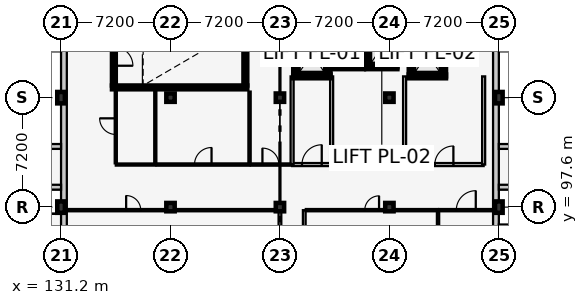
"""IFC4 building model, lengths in metres.
Left out: names, types, materials, properties, quantities, classifications, styles, units other than length and angle.
Written with IfcOpenShell. Run it as: python <this file> out.ifc"""

import sys

from ifc_helpers import new_model, si_unit, direction, frame, frame_2d, origin, origin_2d, place, context, subcontext, project, spatial, rectangle, extrude, element, fill, save


model = new_model("IFC4")
c1 = context("Model", 3, precision=1e-05, world=origin(), true_north=direction((0.0, 1.0)))
c2 = subcontext(c1, "Body", "Model", "MODEL_VIEW")
j1 = project(units=[si_unit("LENGTHUNIT", "METRE"), si_unit("PLANEANGLEUNIT", "RADIAN")], contexts=[c1])
p1 = place(None, origin())
s1 = spatial("IfcSite", under=j1, at=p1, CompositionType="ELEMENT")
p2 = place(p1, origin())
s2 = spatial("IfcBuilding", under=s1, at=p2, CompositionType="ELEMENT")
p3 = place(p2, frame((0.0, 0.0, 29.7)))
s3 = spatial("IfcBuildingStorey", under=s2, at=p3, CompositionType="ELEMENT", Elevation=29.7)
for number, where, z_axis, x_axis in (
    (1, (131.2, 97.6, 0.0), (0.0, 0.0, 1.0), (1.0, 0.0, 0.0)),
    (2, (131.2, 104.8, 0.0), (0.0, 0.0, 1.0), (1.0, 0.0, 0.0)),
):
    element("IfcColumn", number, at=place(p3, frame(where, z_axis=z_axis, x_axis=x_axis)), inside=s3, PredefinedType="COLUMN", context=c2, shape_type="SweptSolid", body=[
        extrude(rectangle(XDim=0.5, YDim=0.75, at=origin_2d()), origin(), (0.0, 0.0, 1.0), 4.2),
    ])
for number, where, z_axis, x_axis in (
    (3, (138.4, 97.6, 0.0), (0.0, 0.0, 1.0), (1.0, 0.0, 0.0)),
    (4, (138.4, 104.8, 0.0), (0.0, 0.0, 1.0), (1.0, 0.0, 0.0)),
    (5, (145.6, 97.6, 0.0), (0.0, 0.0, 1.0), (1.0, 0.0, 0.0)),
    (6, (145.6, 104.8, 0.0), (0.0, 0.0, 1.0), (1.0, 0.0, 0.0)),
    (7, (152.8, 97.6, 0.0), (0.0, 0.0, 1.0), (1.0, 0.0, 0.0)),
    (8, (152.8, 104.8, 0.0), (0.0, 0.0, 1.0), (1.0, 0.0, 0.0)),
):
    element("IfcColumn", number, at=place(p3, frame(where, z_axis=z_axis, x_axis=x_axis)), inside=s3, PredefinedType="COLUMN", context=c2, shape_type="SweptSolid", body=[
        extrude(rectangle(XDim=0.55, YDim=0.55, at=origin_2d()), origin(), (0.0, 0.0, 1.0), 4.2),
    ])
for number, where, z_axis, x_axis in (
    (9, (160.0, 97.6, 0.0), (0.0, 0.0, 1.0), (1.0, 0.0, 0.0)),
    (10, (160.0, 104.8, 0.0), (0.0, 0.0, 1.0), (1.0, 0.0, 0.0)),
):
    element("IfcColumn", number, at=place(p3, frame(where, z_axis=z_axis, x_axis=x_axis)), inside=s3, PredefinedType="COLUMN", context=c2, shape_type="SweptSolid", body=[
        extrude(rectangle(XDim=0.5, YDim=0.75, at=origin_2d()), origin(), (0.0, 0.0, 1.0), 4.2),
    ])
p4 = place(p3, frame((159.81, 112.0, 0.0), z_axis=(0.0, 0.0, 1.0), x_axis=(0.0, -1.0, 0.0)))
e11 = element("IfcWall", 11, at=p4, inside=s3, PredefinedType="SOLIDWALL", context=c2, shape_type="SweptSolid", body=[
    extrude(rectangle(XDim=28.8, YDim=0.38, at=frame_2d((14.4, 0.0))), origin(), (0.0, 0.0, 1.0), 3.455),
])
for number, where, z_axis, x_axis in (
    (12, (160.0, 96.29, 0.0), (0.0, 0.0, 1.0), (1.0, 0.0, 0.0)),
    (13, (160.0, 98.91, 0.0), (0.0, 0.0, 1.0), (1.0, 0.0, 0.0)),
):
    element("IfcWall", number, at=place(p3, frame(where, z_axis=z_axis, x_axis=x_axis)), inside=s3, PredefinedType="SOLIDWALL", context=c2, shape_type="SweptSolid", body=[
        extrude(rectangle(XDim=1.35, YDim=0.32, at=frame_2d((0.675, 0.0))), origin(), (0.0, 0.0, 1.0), 4.18),
    ])
p5 = place(p3, frame((160.0, 101.59, 0.0), z_axis=(0.0, 0.0, 1.0), x_axis=(1.0, 0.0, 0.0)))
e14 = element("IfcWall", 14, at=p5, inside=s3, PredefinedType="SOLIDWALL", context=c2, shape_type="SweptSolid", body=[
    extrude(rectangle(XDim=1.793, YDim=0.32, at=frame_2d((0.896, 0.0))), origin(), (0.0, 0.0, 1.0), 4.18),
])
p6 = place(p3, frame((131.39, 83.2, 0.0), z_axis=(0.0, 0.0, 1.0), x_axis=(0.0, 1.0, 0.0)))
e15 = element("IfcWall", 15, at=p6, inside=s3, PredefinedType="SOLIDWALL", context=c2, shape_type="SweptSolid", body=[
    extrude(rectangle(XDim=28.8, YDim=0.38, at=frame_2d((14.4, 0.0))), origin(), (0.0, 0.0, 1.0), 3.455),
])
p7 = place(p6, frame((10.2, 0.0, 0.0)))
e16 = element("IfcOpeningElement", 16, at=p7, cuts=e15, PredefinedType="OPENING", context=c2, shape_type="SweptSolid", body=[
    extrude(rectangle(XDim=1.2, YDim=2.15, at=frame_2d((0.6, 1.075))), frame((0.0, 0.202, 0.0), z_axis=(0.0, -1.0, 0.0), x_axis=(1.0, 0.0, 0.0)), (0.0, 0.0, 1.0), 0.404),
])
p8 = place(p3, frame((131.2, 98.91, 0.0), z_axis=(0.0, 0.0, 1.0), x_axis=(-1.0, 0.0, 0.0)))
e17 = element("IfcWall", 17, at=p8, inside=s3, PredefinedType="SOLIDWALL", context=c2, shape_type="SweptSolid", body=[
    extrude(rectangle(XDim=1.793, YDim=0.32, at=frame_2d((0.896, 0.0))), origin(), (0.0, 0.0, 1.0), 4.18),
])
p9 = place(p3, frame((131.2, 101.59, 0.0), z_axis=(0.0, 0.0, 1.0), x_axis=(-1.0, 0.0, 0.0)))
e18 = element("IfcWall", 18, at=p9, inside=s3, PredefinedType="SOLIDWALL", context=c2, shape_type="SweptSolid", body=[
    extrude(rectangle(XDim=1.35, YDim=0.32, at=frame_2d((0.675, 0.0))), origin(), (0.0, 0.0, 1.0), 4.18),
])
p10 = place(p3, frame((134.55, 105.475, 0.0), z_axis=(0.0, 0.0, 1.0), x_axis=(1.0, 0.0, 0.0)))
e19 = element("IfcWall", 19, at=p10, inside=s3, PredefinedType="SHEAR", context=c2, shape_type="SweptSolid", body=[
    extrude(rectangle(XDim=8.9, YDim=0.25, at=frame_2d((4.45, 0.0))), origin(), (0.0, 0.0, 1.0), 4.2),
])
p11 = place(p3, frame((134.675, 109.45, 0.0), z_axis=(0.0, 0.0, 1.0), x_axis=(0.0, -1.0, 0.0)))
e20 = element("IfcWall", 20, at=p11, inside=s3, PredefinedType="SHEAR", context=c2, shape_type="SweptSolid", body=[
    extrude(rectangle(XDim=3.85, YDim=0.25, at=frame_2d((1.925, 0.0))), origin(), (0.0, 0.0, 1.0), 4.2),
])
p12 = place(p11, frame((1.3, 0.0, 0.0)))
e21 = element("IfcOpeningElement", 21, at=p12, cuts=e20, PredefinedType="OPENING", context=c2, shape_type="SweptSolid", body=[
    extrude(rectangle(XDim=1.25, YDim=2.15, at=frame_2d((0.625, 1.075))), frame((0.0, 0.137, 0.0), z_axis=(0.0, -1.0, 0.0), x_axis=(1.0, 0.0, 0.0)), (0.0, 0.0, 1.0), 0.274),
])
p13 = place(p3, frame((143.325, 105.6, 0.0), z_axis=(0.0, 0.0, 1.0), x_axis=(0.0, 1.0, 0.0)))
e22 = element("IfcWall", 22, at=p13, inside=s3, PredefinedType="SHEAR", context=c2, shape_type="SweptSolid", body=[
    extrude(rectangle(XDim=3.85, YDim=0.25, at=frame_2d((1.925, 0.0))), origin(), (0.0, 0.0, 1.0), 4.2),
])
p14 = place(p3, frame((146.475, 106.2, 0.0), z_axis=(0.0, 0.0, 1.0), x_axis=(1.0, 0.0, 0.0)))
e23 = element("IfcWall", 23, at=p14, inside=s3, PredefinedType="SHEAR", context=c2, shape_type="SweptSolid", body=[
    extrude(rectangle(XDim=2.45, YDim=0.25, at=frame_2d((1.225, 0.0))), origin(), (0.0, 0.0, 1.0), 4.2),
])
p15 = place(p14, frame((0.675, 0.0, 0.0)))
e24 = element("IfcOpeningElement", 24, at=p15, cuts=e23, PredefinedType="OPENING", context=c2, shape_type="SweptSolid", body=[
    extrude(rectangle(XDim=1.1, YDim=2.15, at=frame_2d((0.55, 1.075))), frame((0.0, 0.137, 0.0), z_axis=(0.0, -1.0, 0.0), x_axis=(1.0, 0.0, 0.0)), (0.0, 0.0, 1.0), 0.274),
])
for number, where, z_axis, x_axis in (
    (25, (146.6, 109.2, 0.0), (0.0, 0.0, 1.0), (0.0, -1.0, 0.0)),
    (26, (148.8, 106.2, 0.0), (0.0, 0.0, 1.0), (0.0, 1.0, 0.0)),
):
    element("IfcWall", number, at=place(p3, frame(where, z_axis=z_axis, x_axis=x_axis)), inside=s3, PredefinedType="SHEAR", context=c2, shape_type="SweptSolid", body=[
        extrude(rectangle(XDim=3.0, YDim=0.25, at=frame_2d((1.5, 0.0))), origin(), (0.0, 0.0, 1.0), 4.2),
    ])
p16 = place(p3, frame((146.4, 100.4, 0.0), z_axis=(0.0, 0.0, 1.0), x_axis=(1.0, 0.0, 0.0)))
e27 = element("IfcWall", 27, at=p16, inside=s3, PredefinedType="PARTITIONING", context=c2, shape_type="SweptSolid", body=[
    extrude(rectangle(XDim=2.6, YDim=0.2, at=frame_2d((1.3, 0.0))), origin(), (0.0, 0.0, 1.0), 4.2),
])
p17 = place(p16, frame((0.65, 0.0, 0.0)))
e28 = element("IfcOpeningElement", 28, at=p17, cuts=e27, PredefinedType="OPENING", context=c2, shape_type="SweptSolid", body=[
    extrude(rectangle(XDim=1.3, YDim=2.2, at=frame_2d((0.65, 1.1))), frame((0.0, 0.112, 0.0), z_axis=(0.0, -1.0, 0.0), x_axis=(1.0, 0.0, 0.0)), (0.0, 0.0, 1.0), 0.224),
])
for number, where, z_axis, x_axis in (
    (29, (146.4, 106.2, 0.0), (0.0, 0.0, 1.0), (0.0, -1.0, 0.0)),
    (30, (149.0, 100.4, 0.0), (0.0, 0.0, 1.0), (0.0, 1.0, 0.0)),
):
    element("IfcWall", number, at=place(p3, frame(where, z_axis=z_axis, x_axis=x_axis)), inside=s3, PredefinedType="PARTITIONING", context=c2, shape_type="SweptSolid", body=[
        extrude(rectangle(XDim=5.8, YDim=0.2, at=frame_2d((2.9, 0.0))), origin(), (0.0, 0.0, 1.0), 4.2),
    ])
p18 = place(p3, frame((154.075, 106.2, 0.0), z_axis=(0.0, 0.0, 1.0), x_axis=(1.0, 0.0, 0.0)))
e31 = element("IfcWall", 31, at=p18, inside=s3, PredefinedType="SHEAR", context=c2, shape_type="SweptSolid", body=[
    extrude(rectangle(XDim=2.45, YDim=0.25, at=frame_2d((1.225, 0.0))), origin(), (0.0, 0.0, 1.0), 4.2),
])
p19 = place(p18, frame((0.675, 0.0, 0.0)))
e32 = element("IfcOpeningElement", 32, at=p19, cuts=e31, PredefinedType="OPENING", context=c2, shape_type="SweptSolid", body=[
    extrude(rectangle(XDim=1.1, YDim=2.15, at=frame_2d((0.55, 1.075))), frame((0.0, 0.137, 0.0), z_axis=(0.0, -1.0, 0.0), x_axis=(1.0, 0.0, 0.0)), (0.0, 0.0, 1.0), 0.274),
])
for number, where, z_axis, x_axis in (
    (33, (154.2, 109.2, 0.0), (0.0, 0.0, 1.0), (0.0, -1.0, 0.0)),
    (34, (156.4, 106.2, 0.0), (0.0, 0.0, 1.0), (0.0, 1.0, 0.0)),
):
    element("IfcWall", number, at=place(p3, frame(where, z_axis=z_axis, x_axis=x_axis)), inside=s3, PredefinedType="SHEAR", context=c2, shape_type="SweptSolid", body=[
        extrude(rectangle(XDim=3.0, YDim=0.25, at=frame_2d((1.5, 0.0))), origin(), (0.0, 0.0, 1.0), 4.2),
    ])
p20 = place(p3, frame((153.8, 100.4, 0.0), z_axis=(0.0, 0.0, 1.0), x_axis=(1.0, 0.0, 0.0)))
e35 = element("IfcWall", 35, at=p20, inside=s3, PredefinedType="PARTITIONING", context=c2, shape_type="SweptSolid", body=[
    extrude(rectangle(XDim=5.2, YDim=0.2, at=frame_2d((2.6, 0.0))), origin(), (0.0, 0.0, 1.0), 4.2),
])
p21 = place(p20, frame((1.99, 0.0, 0.0)))
e36 = element("IfcOpeningElement", 36, at=p21, cuts=e35, PredefinedType="OPENING", context=c2, shape_type="SweptSolid", body=[
    extrude(rectangle(XDim=1.22, YDim=2.2, at=frame_2d((0.61, 1.1))), frame((0.0, 0.112, 0.0), z_axis=(0.0, -1.0, 0.0), x_axis=(1.0, 0.0, 0.0)), (0.0, 0.0, 1.0), 0.224),
])
for number, where, z_axis, x_axis in (
    (37, (153.8, 106.2, 0.0), (0.0, 0.0, 1.0), (0.0, -1.0, 0.0)),
    (38, (159.0, 100.4, 0.0), (0.0, 0.0, 1.0), (0.0, 1.0, 0.0)),
):
    element("IfcWall", number, at=place(p3, frame(where, z_axis=z_axis, x_axis=x_axis)), inside=s3, PredefinedType="PARTITIONING", context=c2, shape_type="SweptSolid", body=[
        extrude(rectangle(XDim=5.8, YDim=0.2, at=frame_2d((2.9, 0.0))), origin(), (0.0, 0.0, 1.0), 4.2),
    ])
p22 = place(p3, frame((149.075, 106.8, 0.0), z_axis=(0.0, 0.0, 1.0), x_axis=(1.0, 0.0, 0.0)))
e39 = element("IfcWall", 39, at=p22, inside=s3, PredefinedType="SHEAR", context=c2, shape_type="SweptSolid", body=[
    extrude(rectangle(XDim=2.05, YDim=0.25, at=frame_2d((1.025, 0.0))), origin(), (0.0, 0.0, 1.0), 4.2),
])
p23 = place(p22, frame((0.525, 0.0, 0.0)))
e40 = element("IfcOpeningElement", 40, at=p23, cuts=e39, PredefinedType="OPENING", context=c2, shape_type="SweptSolid", body=[
    extrude(rectangle(XDim=1.0, YDim=2.15, at=frame_2d((0.5, 1.075))), frame((0.0, 0.137, 0.0), z_axis=(0.0, -1.0, 0.0), x_axis=(1.0, 0.0, 0.0)), (0.0, 0.0, 1.0), 0.274),
])
for number, where, z_axis, x_axis in (
    (41, (149.2, 109.4, 0.0), (0.0, 0.0, 1.0), (0.0, -1.0, 0.0)),
    (42, (151.0, 106.8, 0.0), (0.0, 0.0, 1.0), (0.0, 1.0, 0.0)),
):
    element("IfcWall", number, at=place(p3, frame(where, z_axis=z_axis, x_axis=x_axis)), inside=s3, PredefinedType="SHEAR", context=c2, shape_type="SweptSolid", body=[
        extrude(rectangle(XDim=2.6, YDim=0.25, at=frame_2d((1.3, 0.0))), origin(), (0.0, 0.0, 1.0), 4.2),
    ])
p24 = place(p3, frame((151.275, 106.8, 0.0), z_axis=(0.0, 0.0, 1.0), x_axis=(1.0, 0.0, 0.0)))
e43 = element("IfcWall", 43, at=p24, inside=s3, PredefinedType="SHEAR", context=c2, shape_type="SweptSolid", body=[
    extrude(rectangle(XDim=2.05, YDim=0.25, at=frame_2d((1.025, 0.0))), origin(), (0.0, 0.0, 1.0), 4.2),
])
p25 = place(p24, frame((0.525, 0.0, 0.0)))
e44 = element("IfcOpeningElement", 44, at=p25, cuts=e43, PredefinedType="OPENING", context=c2, shape_type="SweptSolid", body=[
    extrude(rectangle(XDim=1.0, YDim=2.15, at=frame_2d((0.5, 1.075))), frame((0.0, 0.137, 0.0), z_axis=(0.0, -1.0, 0.0), x_axis=(1.0, 0.0, 0.0)), (0.0, 0.0, 1.0), 0.274),
])
for number, where, z_axis, x_axis in (
    (45, (151.4, 109.4, 0.0), (0.0, 0.0, 1.0), (0.0, -1.0, 0.0)),
    (46, (153.2, 106.8, 0.0), (0.0, 0.0, 1.0), (0.0, 1.0, 0.0)),
):
    element("IfcWall", number, at=place(p3, frame(where, z_axis=z_axis, x_axis=x_axis)), inside=s3, PredefinedType="SHEAR", context=c2, shape_type="SweptSolid", body=[
        extrude(rectangle(XDim=2.6, YDim=0.25, at=frame_2d((1.3, 0.0))), origin(), (0.0, 0.0, 1.0), 4.2),
    ])
p26 = place(p3, frame((145.6, 90.4, 0.0), z_axis=(0.0, 0.0, 1.0), x_axis=(0.0, 1.0, 0.0)))
e47 = element("IfcWall", 47, at=p26, inside=s3, PredefinedType="PARTITIONING", context=c2, shape_type="SweptSolid", body=[
    extrude(rectangle(XDim=7.0, YDim=0.18, at=frame_2d((3.5, 0.0))), origin(), (0.0, 0.0, 1.0), 3.575),
])
p27 = place(p3, frame((147.2, 90.4, 0.0), z_axis=(0.0, 0.0, 1.0), x_axis=(0.0, 1.0, 0.0)))
e48 = element("IfcWall", 48, at=p27, inside=s3, PredefinedType="PARTITIONING", context=c2, shape_type="SweptSolid", body=[
    extrude(rectangle(XDim=7.0, YDim=0.18, at=frame_2d((3.5, 0.0))), origin(), (0.0, 0.0, 1.0), 4.2),
])
p28 = place(p3, frame((134.8, 100.4, 0.0), z_axis=(0.0, 0.0, 1.0), x_axis=(1.0, 0.0, 0.0)))
e49 = element("IfcWall", 49, at=p28, inside=s3, PredefinedType="PARTITIONING", context=c2, shape_type="SweptSolid", body=[
    extrude(rectangle(XDim=2.6, YDim=0.14, at=frame_2d((1.3, 0.0))), origin(), (0.0, 0.0, 1.0), 4.2),
])
p29 = place(p3, frame((134.8, 100.48, 0.0), z_axis=(0.0, 0.0, 1.0), x_axis=(0.0, 1.0, 0.0)))
e50 = element("IfcWall", 50, at=p29, inside=s3, PredefinedType="PARTITIONING", context=c2, shape_type="SweptSolid", body=[
    extrude(rectangle(XDim=4.86, YDim=0.14, at=frame_2d((2.43, 0.0))), origin(), (0.0, 0.0, 1.0), 4.2),
])
p30 = place(p29, frame((1.9, 0.0, 0.0)))
e51 = element("IfcOpeningElement", 51, at=p30, cuts=e50, PredefinedType="OPENING", context=c2, shape_type="SweptSolid", body=[
    extrude(rectangle(XDim=1.06, YDim=2.1, at=frame_2d((0.53, 1.05))), frame((0.0, 0.082, 0.0), z_axis=(0.0, -1.0, 0.0), x_axis=(1.0, 0.0, 0.0)), (0.0, 0.0, 1.0), 0.164),
])
p31 = place(p3, frame((137.4, 100.48, 0.0), z_axis=(0.0, 0.0, 1.0), x_axis=(0.0, 1.0, 0.0)))
e52 = element("IfcWall", 52, at=p31, inside=s3, PredefinedType="PARTITIONING", context=c2, shape_type="SweptSolid", body=[
    extrude(rectangle(XDim=4.86, YDim=0.14, at=frame_2d((2.43, 0.0))), origin(), (0.0, 0.0, 1.0), 4.2),
])
p32 = place(p3, frame((131.6, 97.4, 0.0), z_axis=(0.0, 0.0, 1.0), x_axis=(1.0, 0.0, 0.0)))
e53 = element("IfcWall", 53, at=p32, inside=s3, PredefinedType="PARTITIONING", context=c2, shape_type="SweptSolid", body=[
    extrude(rectangle(XDim=13.9, YDim=0.15, at=frame_2d((6.95, 0.0))), origin(), (0.0, 0.0, 1.0), 3.525),
])
p33 = place(p32, frame((3.882, 0.0, 0.0)))
e54 = element("IfcOpeningElement", 54, at=p33, cuts=e53, PredefinedType="OPENING", context=c2, shape_type="SweptSolid", body=[
    extrude(rectangle(XDim=0.96, YDim=2.1, at=frame_2d((0.48, 1.05))), frame((0.0, 0.087, 0.0), z_axis=(0.0, -1.0, 0.0), x_axis=(1.0, 0.0, 0.0)), (0.0, 0.0, 1.0), 0.174),
])
p34 = place(p3, frame((147.3, 97.4, 0.0), z_axis=(0.0, 0.0, 1.0), x_axis=(1.0, 0.0, 0.0)))
e55 = element("IfcWall", 55, at=p34, inside=s3, PredefinedType="PARTITIONING", context=c2, shape_type="SweptSolid", body=[
    extrude(rectangle(XDim=8.7, YDim=0.15, at=frame_2d((4.35, 0.0))), origin(), (0.0, 0.0, 1.0), 3.375),
])
p35 = place(p34, frame((3.88, 0.0, 0.0)))
e56 = element("IfcOpeningElement", 56, at=p35, cuts=e55, PredefinedType="OPENING", context=c2, shape_type="SweptSolid", body=[
    extrude(rectangle(XDim=0.94, YDim=2.1, at=frame_2d((0.47, 1.05))), frame((0.0, 0.087, 0.0), z_axis=(0.0, -1.0, 0.0), x_axis=(1.0, 0.0, 0.0)), (0.0, 0.0, 1.0), 0.174),
])
p36 = place(p3, frame((156.0, 88.71, 0.0), z_axis=(0.0, 0.0, 1.0), x_axis=(0.0, 1.0, 0.0)))
e57 = element("IfcWall", 57, at=p36, inside=s3, PredefinedType="PARTITIONING", context=c2, shape_type="SweptSolid", body=[
    extrude(rectangle(XDim=8.605, YDim=0.15, at=frame_2d((4.302, 0.0))), origin(), (0.0, 0.0, 1.0), 4.2),
])
p37 = place(p3, frame((156.085, 97.4, 0.0), z_axis=(0.0, 0.0, 1.0), x_axis=(1.0, 0.0, 0.0)))
e58 = element("IfcWall", 58, at=p37, inside=s3, PredefinedType="PARTITIONING", context=c2, shape_type="SweptSolid", body=[
    extrude(rectangle(XDim=3.515, YDim=0.15, at=frame_2d((1.758, 0.0))), origin(), (0.0, 0.0, 1.0), 3.375),
])
p38 = place(p37, frame((1.117, 0.0, 0.0)))
e59 = element("IfcOpeningElement", 59, at=p38, cuts=e58, PredefinedType="OPENING", context=c2, shape_type="SweptSolid", body=[
    extrude(rectangle(XDim=1.28, YDim=2.2, at=frame_2d((0.64, 1.1))), frame((0.0, 0.087, 0.0), z_axis=(0.0, -1.0, 0.0), x_axis=(1.0, 0.0, 0.0)), (0.0, 0.0, 1.0), 0.174),
])
p39 = place(p3, frame((137.48, 100.4, 0.0), z_axis=(0.0, 0.0, 1.0), x_axis=(1.0, 0.0, 0.0)))
e60 = element("IfcWall", 60, at=p39, inside=s3, PredefinedType="PARTITIONING", context=c2, shape_type="SweptSolid", body=[
    extrude(rectangle(XDim=6.12, YDim=0.15, at=frame_2d((3.06, 0.0))), origin(), (0.0, 0.0, 1.0), 4.2),
])
p40 = place(p39, frame((2.5, 0.0, 0.0)))
e61 = element("IfcOpeningElement", 61, at=p40, cuts=e60, PredefinedType="OPENING", context=c2, shape_type="SweptSolid", body=[
    extrude(rectangle(XDim=1.12, YDim=2.15, at=frame_2d((0.56, 1.075))), frame((0.0, 0.087, 0.0), z_axis=(0.0, -1.0, 0.0), x_axis=(1.0, 0.0, 0.0)), (0.0, 0.0, 1.0), 0.174),
])
p41 = place(p3, frame((143.6, 100.485, 0.0), z_axis=(0.0, 0.0, 1.0), x_axis=(0.0, 1.0, 0.0)))
e62 = element("IfcWall", 62, at=p41, inside=s3, PredefinedType="PARTITIONING", context=c2, shape_type="SweptSolid", body=[
    extrude(rectangle(XDim=4.715, YDim=0.15, at=frame_2d((2.357, 0.0))), origin(), (0.0, 0.0, 1.0), 4.2),
])
p42 = place(p3, frame((143.685, 100.4, 0.0), z_axis=(0.0, 0.0, 1.0), x_axis=(1.0, 0.0, 0.0)))
e63 = element("IfcWall", 63, at=p42, inside=s3, PredefinedType="PARTITIONING", context=c2, shape_type="SweptSolid", body=[
    extrude(rectangle(XDim=2.605, YDim=0.15, at=frame_2d((1.302, 0.0))), origin(), (0.0, 0.0, 1.0), 4.2),
])
p43 = place(p42, frame((0.762, 0.0, 0.0)))
e64 = element("IfcOpeningElement", 64, at=p43, cuts=e63, PredefinedType="OPENING", context=c2, shape_type="SweptSolid", body=[
    extrude(rectangle(XDim=1.08, YDim=2.15, at=frame_2d((0.54, 1.075))), frame((0.0, 0.087, 0.0), z_axis=(0.0, -1.0, 0.0), x_axis=(1.0, 0.0, 0.0)), (0.0, 0.0, 1.0), 0.174),
])
p44 = place(p12, origin())
e65 = element("IfcDoor", 65, at=p44, inside=s3, OperationType="SINGLE_SWING_RIGHT", PredefinedType="DOOR", context=c2, shape_type="SweptSolid", body=[
    extrude(rectangle(XDim=1.25, YDim=2.15, at=frame_2d((0.625, 1.075))), frame((0.0, 0.025, 0.0), z_axis=(0.0, -1.0, 0.0), x_axis=(1.0, 0.0, 0.0)), (0.0, 0.0, 1.0), 0.05),
])
fill(e21, e65)
p45 = place(p15, origin())
e66 = element("IfcDoor", 66, at=p45, inside=s3, OperationType="SLIDING_TO_LEFT", PredefinedType="DOOR", context=c2, shape_type="SweptSolid", body=[
    extrude(rectangle(XDim=1.1, YDim=2.15, at=frame_2d((0.55, 1.075))), frame((0.0, 0.025, 0.0), z_axis=(0.0, -1.0, 0.0), x_axis=(1.0, 0.0, 0.0)), (0.0, 0.0, 1.0), 0.05),
])
fill(e24, e66)
p46 = place(p17, origin())
e67 = element("IfcDoor", 67, at=p46, inside=s3, OperationType="SINGLE_SWING_RIGHT", PredefinedType="DOOR", context=c2, shape_type="SweptSolid", body=[
    extrude(rectangle(XDim=1.3, YDim=2.2, at=frame_2d((0.65, 1.1))), frame((0.0, 0.025, 0.0), z_axis=(0.0, -1.0, 0.0), x_axis=(1.0, 0.0, 0.0)), (0.0, 0.0, 1.0), 0.05),
])
fill(e28, e67)
p47 = place(p19, origin())
e68 = element("IfcDoor", 68, at=p47, inside=s3, OperationType="SLIDING_TO_LEFT", PredefinedType="DOOR", context=c2, shape_type="SweptSolid", body=[
    extrude(rectangle(XDim=1.1, YDim=2.15, at=frame_2d((0.55, 1.075))), frame((0.0, 0.025, 0.0), z_axis=(0.0, -1.0, 0.0), x_axis=(1.0, 0.0, 0.0)), (0.0, 0.0, 1.0), 0.05),
])
fill(e32, e68)
p48 = place(p21, origin())
e69 = element("IfcDoor", 69, at=p48, inside=s3, OperationType="SINGLE_SWING_RIGHT", PredefinedType="DOOR", context=c2, shape_type="SweptSolid", body=[
    extrude(rectangle(XDim=1.22, YDim=2.2, at=frame_2d((0.61, 1.1))), frame((0.0, 0.025, 0.0), z_axis=(0.0, -1.0, 0.0), x_axis=(1.0, 0.0, 0.0)), (0.0, 0.0, 1.0), 0.05),
])
fill(e36, e69)
p49 = place(p23, origin())
e70 = element("IfcDoor", 70, at=p49, inside=s3, OperationType="SLIDING_TO_LEFT", PredefinedType="DOOR", context=c2, shape_type="SweptSolid", body=[
    extrude(rectangle(XDim=1.0, YDim=2.15, at=frame_2d((0.5, 1.075))), frame((0.0, 0.025, 0.0), z_axis=(0.0, -1.0, 0.0), x_axis=(1.0, 0.0, 0.0)), (0.0, 0.0, 1.0), 0.05),
])
fill(e40, e70)
p50 = place(p25, origin())
e71 = element("IfcDoor", 71, at=p50, inside=s3, OperationType="SLIDING_TO_LEFT", PredefinedType="DOOR", context=c2, shape_type="SweptSolid", body=[
    extrude(rectangle(XDim=1.0, YDim=2.15, at=frame_2d((0.5, 1.075))), frame((0.0, 0.025, 0.0), z_axis=(0.0, -1.0, 0.0), x_axis=(1.0, 0.0, 0.0)), (0.0, 0.0, 1.0), 0.05),
])
fill(e44, e71)
p51 = place(p30, origin())
e72 = element("IfcDoor", 72, at=p51, inside=s3, OperationType="SINGLE_SWING_RIGHT", PredefinedType="DOOR", context=c2, shape_type="SweptSolid", body=[
    extrude(rectangle(XDim=1.06, YDim=2.1, at=frame_2d((0.53, 1.05))), frame((0.0, 0.025, 0.0), z_axis=(0.0, -1.0, 0.0), x_axis=(1.0, 0.0, 0.0)), (0.0, 0.0, 1.0), 0.05),
])
fill(e51, e72)
p52 = place(p33, origin())
e73 = element("IfcDoor", 73, at=p52, inside=s3, OperationType="SINGLE_SWING_LEFT", PredefinedType="DOOR", context=c2, shape_type="SweptSolid", body=[
    extrude(rectangle(XDim=0.96, YDim=2.1, at=frame_2d((0.48, 1.05))), frame((0.0, 0.025, 0.0), z_axis=(0.0, -1.0, 0.0), x_axis=(1.0, 0.0, 0.0)), (0.0, 0.0, 1.0), 0.05),
])
fill(e54, e73)
p53 = place(p35, origin())
e74 = element("IfcDoor", 74, at=p53, inside=s3, OperationType="SINGLE_SWING_RIGHT", PredefinedType="DOOR", context=c2, shape_type="SweptSolid", body=[
    extrude(rectangle(XDim=0.94, YDim=2.1, at=frame_2d((0.47, 1.05))), frame((0.0, 0.025, 0.0), z_axis=(0.0, -1.0, 0.0), x_axis=(1.0, 0.0, 0.0)), (0.0, 0.0, 1.0), 0.05),
])
fill(e56, e74)
p54 = place(p38, origin())
e75 = element("IfcDoor", 75, at=p54, inside=s3, OperationType="SINGLE_SWING_RIGHT", PredefinedType="DOOR", context=c2, shape_type="SweptSolid", body=[
    extrude(rectangle(XDim=1.28, YDim=2.2, at=frame_2d((0.64, 1.1))), frame((0.0, 0.025, 0.0), z_axis=(0.0, -1.0, 0.0), x_axis=(1.0, 0.0, 0.0)), (0.0, 0.0, 1.0), 0.05),
])
fill(e59, e75)
p55 = place(p40, origin())
e76 = element("IfcDoor", 76, at=p55, inside=s3, OperationType="SINGLE_SWING_RIGHT", PredefinedType="DOOR", context=c2, shape_type="SweptSolid", body=[
    extrude(rectangle(XDim=1.12, YDim=2.15, at=frame_2d((0.56, 1.075))), frame((0.0, 0.025, 0.0), z_axis=(0.0, -1.0, 0.0), x_axis=(1.0, 0.0, 0.0)), (0.0, 0.0, 1.0), 0.05),
])
fill(e61, e76)
p56 = place(p43, origin())
e77 = element("IfcDoor", 77, at=p56, inside=s3, OperationType="SINGLE_SWING_LEFT", PredefinedType="DOOR", context=c2, shape_type="SweptSolid", body=[
    extrude(rectangle(XDim=1.08, YDim=2.15, at=frame_2d((0.54, 1.075))), frame((0.0, 0.025, 0.0), z_axis=(0.0, -1.0, 0.0), x_axis=(1.0, 0.0, 0.0)), (0.0, 0.0, 1.0), 0.05),
])
fill(e64, e77)
save(model, sys.argv[1])
